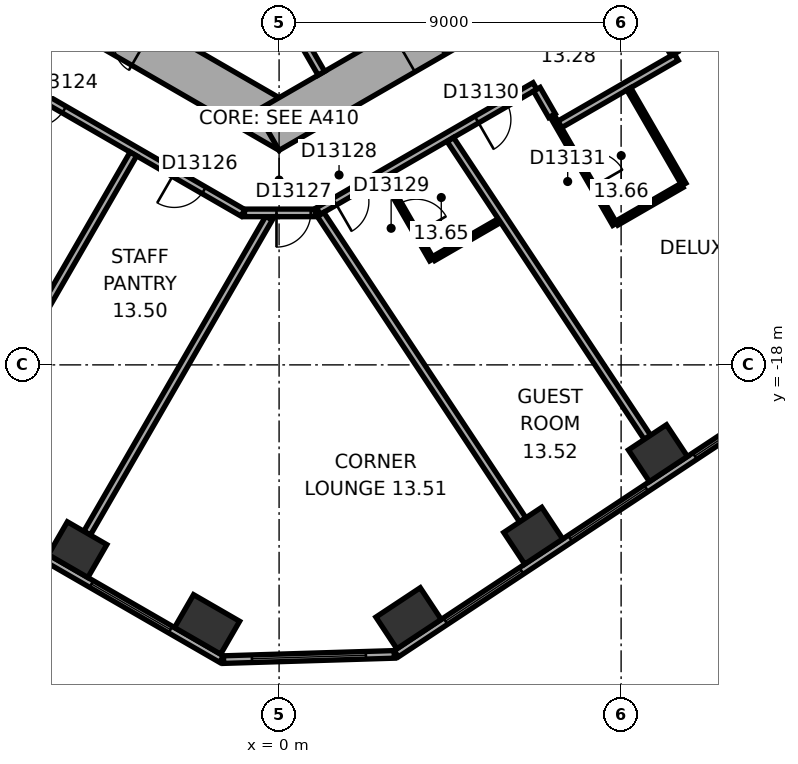
"""IFC4 building model, lengths in metres.
Left out: names, types, materials, properties, quantities, classifications, styles, units other than length and angle.
Written with IfcOpenShell. Run it as: python <this file> out.ifc"""

import sys

from ifc_helpers import new_model, si_unit, direction, frame, frame_2d, origin, origin_2d, place, context, subcontext, project, spatial, rectangle, extrude, element, fill, save


model = new_model("IFC4")
c1 = context("Model", 3, precision=1e-05, world=origin(), true_north=direction((0.0, 1.0)))
c2 = subcontext(c1, "Body", "Model", "MODEL_VIEW")
j1 = project(units=[si_unit("LENGTHUNIT", "METRE"), si_unit("PLANEANGLEUNIT", "RADIAN")], contexts=[c1])
p1 = place(None, origin())
s1 = spatial("IfcSite", under=j1, at=p1, CompositionType="ELEMENT")
p2 = place(p1, origin())
s2 = spatial("IfcBuilding", under=s1, at=p2, CompositionType="ELEMENT")
p3 = place(p2, frame((0.0, 0.0, 63.8)))
s3 = spatial("IfcBuildingStorey", under=s2, at=p3, CompositionType="ELEMENT", Elevation=63.8)
p4 = place(p3, frame((-5.302, -22.862, 0.0), z_axis=(0.0, 0.0, 1.0), x_axis=(0.866025403784, -0.5, 0.0)))
e1 = element("IfcColumn", 1, at=p4, inside=s3, PredefinedType="COLUMN", context=c2, shape_type="SweptSolid", body=[
    extrude(rectangle(XDim=1.2, YDim=1.0, at=origin_2d()), origin(), (0.0, 0.0, 1.0), 3.3),
])
for number, where, z_axis, x_axis in (
    (2, (-1.895, -24.829, 0.0), (0.0, 0.0, 1.0), (0.866, -0.5, 0.0)),
    (3, (3.407, -24.667, 0.0), (0.0, 0.0, 1.0), (0.834, 0.552, 0.0)),
):
    element("IfcColumn", number, at=place(p3, frame(where, z_axis=z_axis, x_axis=x_axis)), inside=s3, PredefinedType="COLUMN", context=c2, shape_type="SweptSolid", body=[
        extrude(rectangle(XDim=1.4, YDim=1.0, at=origin_2d()), origin(), (0.0, 0.0, 1.0), 3.3),
    ])
for number, where, z_axis, x_axis in (
    (4, (6.688, -22.496, 0.0), (0.0, 0.0, 1.0), (0.834, 0.552, 0.0)),
    (5, (9.969, -20.324, 0.0), (0.0, 0.0, 1.0), (0.834, 0.552, 0.0)),
):
    element("IfcColumn", number, at=place(p3, frame(where, z_axis=z_axis, x_axis=x_axis)), inside=s3, PredefinedType="COLUMN", context=c2, shape_type="SweptSolid", body=[
        extrude(rectangle(XDim=1.2, YDim=1.0, at=origin_2d()), origin(), (0.0, 0.0, 1.0), 3.3),
    ])
p5 = place(p3, frame((-10.4, -5.658, 0.0), z_axis=(0.0, 0.0, 1.0), x_axis=(0.866021384402, -0.500006961711, 0.0)))
e6 = element("IfcWall", 6, at=p5, inside=s3, PredefinedType="SHEAR", context=c2, shape_type="SweptSolid", body=[
    extrude(rectangle(XDim=12.355, YDim=1.2, at=frame_2d((6.178, 0.0))), origin(), (0.0, 0.0, 1.0), 3.3),
])
p6 = place(p5, frame((6.378, 0.0, 0.0)))
e7 = element("IfcOpeningElement", 7, at=p6, cuts=e6, PredefinedType="OPENING", context=c2, shape_type="SweptSolid", body=[
    extrude(rectangle(XDim=1.5, YDim=2.1, at=frame_2d((0.75, 1.05))), frame((0.0, 0.61, 0.0), z_axis=(0.0, -1.0, 0.0), x_axis=(1.0, 0.0, 0.0)), (0.0, 0.0, 1.0), 1.22),
])
p7 = place(p5, frame((3.228, 0.0, 0.0)))
e8 = element("IfcOpeningElement", 8, at=p7, cuts=e6, PredefinedType="OPENING", context=c2, shape_type="SweptSolid", body=[
    extrude(rectangle(XDim=0.9, YDim=2.1, at=frame_2d((0.45, 1.05))), frame((0.0, 0.61, 0.0), z_axis=(0.0, -1.0, 0.0), x_axis=(1.0, 0.0, 0.0)), (0.0, 0.0, 1.0), 1.22),
])
p8 = place(p3, frame((-0.3, -11.836, 0.0), z_axis=(0.0, 0.0, 1.0), x_axis=(0.866021384402, 0.500006961711, 0.0)))
e9 = element("IfcWall", 9, at=p8, inside=s3, PredefinedType="SHEAR", context=c2, shape_type="SweptSolid", body=[
    extrude(rectangle(XDim=12.355, YDim=1.2, at=frame_2d((6.178, 0.0))), origin(), (0.0, 0.0, 1.0), 3.3),
])
p9 = place(p8, frame((4.128, 0.0, 0.0)))
e10 = element("IfcOpeningElement", 10, at=p9, cuts=e9, PredefinedType="OPENING", context=c2, shape_type="SweptSolid", body=[
    extrude(rectangle(XDim=0.9, YDim=2.1, at=frame_2d((0.45, 1.05))), frame((0.0, 0.61, 0.0), z_axis=(0.0, -1.0, 0.0), x_axis=(1.0, 0.0, 0.0)), (0.0, 0.0, 1.0), 1.22),
])
p10 = place(p8, frame((7.928, 0.0, 0.0)))
e11 = element("IfcOpeningElement", 11, at=p10, cuts=e9, PredefinedType="OPENING", context=c2, shape_type="SweptSolid", body=[
    extrude(rectangle(XDim=1.1, YDim=2.1, at=frame_2d((0.55, 1.05))), frame((0.0, 0.61, 0.0), z_axis=(0.0, -1.0, 0.0), x_axis=(1.0, 0.0, 0.0)), (0.0, 0.0, 1.0), 1.22),
])
p11 = place(p3, frame((-19.914, -15.119, 0.0), z_axis=(0.0, 0.0, 1.0), x_axis=(0.866025418898, -0.499999973822, 0.0)))
e12 = element("IfcWall", 12, at=p11, inside=s3, PredefinedType="STANDARD", context=c2, shape_type="SweptSolid", body=[
    extrude(rectangle(XDim=21.246, YDim=0.2, at=frame_2d((10.623, 0.0))), origin(), (0.0, 0.0, 1.0), 3.3),
])
p12 = place(p11, frame((1.555, 0.0, 0.8)))
e13 = element("IfcOpeningElement", 13, at=p12, cuts=e12, PredefinedType="OPENING", context=c2, shape_type="SweptSolid", body=[
    extrude(rectangle(XDim=2.4, YDim=1.7, at=frame_2d((1.2, 0.85))), frame((0.0, 0.11, 0.0), z_axis=(0.0, -1.0, 0.0), x_axis=(1.0, 0.0, 0.0)), (0.0, 0.0, 1.0), 0.22),
])
p13 = place(p11, frame((5.489, 0.0, 0.8)))
e14 = element("IfcOpeningElement", 14, at=p13, cuts=e12, PredefinedType="OPENING", context=c2, shape_type="SweptSolid", body=[
    extrude(rectangle(XDim=2.4, YDim=1.7, at=frame_2d((1.2, 0.85))), frame((0.0, 0.11, 0.0), z_axis=(0.0, -1.0, 0.0), x_axis=(1.0, 0.0, 0.0)), (0.0, 0.0, 1.0), 0.22),
])
p14 = place(p11, frame((9.424, 0.0, 0.8)))
e15 = element("IfcOpeningElement", 15, at=p14, cuts=e12, PredefinedType="OPENING", context=c2, shape_type="SweptSolid", body=[
    extrude(rectangle(XDim=2.4, YDim=1.7, at=frame_2d((1.2, 0.85))), frame((0.0, 0.11, 0.0), z_axis=(0.0, -1.0, 0.0), x_axis=(1.0, 0.0, 0.0)), (0.0, 0.0, 1.0), 0.22),
])
p15 = place(p11, frame((13.358, 0.0, 0.8)))
e16 = element("IfcOpeningElement", 16, at=p15, cuts=e12, PredefinedType="OPENING", context=c2, shape_type="SweptSolid", body=[
    extrude(rectangle(XDim=2.4, YDim=1.7, at=frame_2d((1.2, 0.85))), frame((0.0, 0.11, 0.0), z_axis=(0.0, -1.0, 0.0), x_axis=(1.0, 0.0, 0.0)), (0.0, 0.0, 1.0), 0.22),
])
p16 = place(p11, frame((17.293, 0.0, 0.8)))
e17 = element("IfcOpeningElement", 17, at=p16, cuts=e12, PredefinedType="OPENING", context=c2, shape_type="SweptSolid", body=[
    extrude(rectangle(XDim=2.4, YDim=1.7, at=frame_2d((1.2, 0.85))), frame((0.0, 0.11, 0.0), z_axis=(0.0, -1.0, 0.0), x_axis=(1.0, 0.0, 0.0)), (0.0, 0.0, 1.0), 0.22),
])
p17 = place(p3, frame((-1.461, -25.755, 0.0), z_axis=(0.0, 0.0, 1.0), x_axis=(0.999533823446, 0.030530898895, 0.0)))
e18 = element("IfcWall", 18, at=p17, inside=s3, PredefinedType="STANDARD", context=c2, shape_type="SweptSolid", body=[
    extrude(rectangle(XDim=4.494, YDim=0.2, at=frame_2d((2.247, 0.0))), origin(), (0.0, 0.0, 1.0), 3.3),
])
p18 = place(p17, frame((0.747, 0.0, 0.8)))
e19 = element("IfcOpeningElement", 19, at=p18, cuts=e18, PredefinedType="OPENING", context=c2, shape_type="SweptSolid", body=[
    extrude(rectangle(XDim=3.0, YDim=1.7, at=frame_2d((1.5, 0.85))), frame((0.0, 0.11, 0.0), z_axis=(0.0, -1.0, 0.0), x_axis=(1.0, 0.0, 0.0)), (0.0, 0.0, 1.0), 0.22),
])
p19 = place(p3, frame((3.083, -25.601, 0.0), z_axis=(0.0, 0.0, 1.0), x_axis=(0.833884295743, 0.551939291329, 0.0)))
e20 = element("IfcWall", 20, at=p19, inside=s3, PredefinedType="STANDARD", context=c2, shape_type="SweptSolid", body=[
    extrude(rectangle(XDim=21.246, YDim=0.2, at=frame_2d((10.623, 0.0))), origin(), (0.0, 0.0, 1.0), 3.3),
])
p20 = place(p19, frame((1.553, 0.0, 0.8)))
e21 = element("IfcOpeningElement", 21, at=p20, cuts=e20, PredefinedType="OPENING", context=c2, shape_type="SweptSolid", body=[
    extrude(rectangle(XDim=2.4, YDim=1.7, at=frame_2d((1.2, 0.85))), frame((0.0, 0.11, 0.0), z_axis=(0.0, -1.0, 0.0), x_axis=(1.0, 0.0, 0.0)), (0.0, 0.0, 1.0), 0.22),
])
p21 = place(p19, frame((5.488, 0.0, 0.8)))
e22 = element("IfcOpeningElement", 22, at=p21, cuts=e20, PredefinedType="OPENING", context=c2, shape_type="SweptSolid", body=[
    extrude(rectangle(XDim=2.4, YDim=1.7, at=frame_2d((1.2, 0.85))), frame((0.0, 0.11, 0.0), z_axis=(0.0, -1.0, 0.0), x_axis=(1.0, 0.0, 0.0)), (0.0, 0.0, 1.0), 0.22),
])
p22 = place(p19, frame((9.422, 0.0, 0.8)))
e23 = element("IfcOpeningElement", 23, at=p22, cuts=e20, PredefinedType="OPENING", context=c2, shape_type="SweptSolid", body=[
    extrude(rectangle(XDim=2.4, YDim=1.7, at=frame_2d((1.2, 0.85))), frame((0.0, 0.11, 0.0), z_axis=(0.0, -1.0, 0.0), x_axis=(1.0, 0.0, 0.0)), (0.0, 0.0, 1.0), 0.22),
])
p23 = place(p19, frame((13.357, 0.0, 0.8)))
e24 = element("IfcOpeningElement", 24, at=p23, cuts=e20, PredefinedType="OPENING", context=c2, shape_type="SweptSolid", body=[
    extrude(rectangle(XDim=2.4, YDim=1.7, at=frame_2d((1.2, 0.85))), frame((0.0, 0.11, 0.0), z_axis=(0.0, -1.0, 0.0), x_axis=(1.0, 0.0, 0.0)), (0.0, 0.0, 1.0), 0.22),
])
p24 = place(p19, frame((17.291, 0.0, 0.8)))
e25 = element("IfcOpeningElement", 25, at=p24, cuts=e20, PredefinedType="OPENING", context=c2, shape_type="SweptSolid", body=[
    extrude(rectangle(XDim=2.4, YDim=1.7, at=frame_2d((1.2, 0.85))), frame((0.0, 0.11, 0.0), z_axis=(0.0, -1.0, 0.0), x_axis=(1.0, 0.0, 0.0)), (0.0, 0.0, 1.0), 0.22),
])
p25 = place(p3, frame((0.013, -8.422, 0.0), z_axis=(0.0, 0.0, 1.0), x_axis=(0.500077893725, -0.86598042715, 0.0)))
e26 = element("IfcWall", 26, at=p25, inside=s3, PredefinedType="PARTITIONING", context=c2, shape_type="SweptSolid", body=[
    extrude(rectangle(XDim=2.2, YDim=0.2, at=frame_2d((1.1, 0.0))), origin(), (0.0, 0.0, 1.0), 3.05),
])
p26 = place(p3, frame((-11.615, -7.843, 0.0), z_axis=(0.0, 0.0, 1.0), x_axis=(0.866026466995, -0.499998158461, 0.0)))
e27 = element("IfcWall", 27, at=p26, inside=s3, PredefinedType="PARTITIONING", context=c2, shape_type="SweptSolid", body=[
    extrude(rectangle(XDim=12.315, YDim=0.2, at=frame_2d((6.158, 0.0))), origin(), (0.0, 0.0, 1.0), 3.05),
])
p27 = place(p26, frame((5.983, 0.0, 0.0)))
e28 = element("IfcOpeningElement", 28, at=p27, cuts=e27, PredefinedType="OPENING", context=c2, shape_type="SweptSolid", body=[
    extrude(rectangle(XDim=0.9, YDim=2.1, at=frame_2d((0.45, 1.05))), frame((0.0, 0.11, 0.0), z_axis=(0.0, -1.0, 0.0), x_axis=(1.0, 0.0, 0.0)), (0.0, 0.0, 1.0), 0.22),
])
p28 = place(p26, frame((10.229, 0.0, 0.0)))
e29 = element("IfcOpeningElement", 29, at=p28, cuts=e27, PredefinedType="OPENING", context=c2, shape_type="SweptSolid", body=[
    extrude(rectangle(XDim=0.9, YDim=2.1, at=frame_2d((0.45, 1.05))), frame((0.0, 0.11, 0.0), z_axis=(0.0, -1.0, 0.0), x_axis=(1.0, 0.0, 0.0)), (0.0, 0.0, 1.0), 0.22),
])
p29 = place(p3, frame((-8.46, -20.461, 0.0), z_axis=(0.0, 0.0, 1.0), x_axis=(0.499999662836, 0.866025598446, 0.0)))
e30 = element("IfcWall", 30, at=p29, inside=s3, PredefinedType="PARTITIONING", context=c2, shape_type="SweptSolid", body=[
    extrude(rectangle(XDim=9.25, YDim=0.2, at=frame_2d((4.625, 0.0))), origin(), (0.0, 0.0, 1.0), 3.05),
])
p30 = place(p3, frame((-5.052, -22.429, 0.0), z_axis=(0.0, 0.0, 1.0), x_axis=(0.500004329283, 0.866022904257, 0.0)))
e31 = element("IfcWall", 31, at=p30, inside=s3, PredefinedType="PARTITIONING", context=c2, shape_type="SweptSolid", body=[
    extrude(rectangle(XDim=9.572, YDim=0.2, at=frame_2d((4.786, 0.0))), origin(), (0.0, 0.0, 1.0), 3.05),
])
p31 = place(p3, frame((-0.91, -14.001, 0.0), z_axis=(0.0, 0.0, 1.0), x_axis=(1.0, 0.0, 0.0)))
e32 = element("IfcWall", 32, at=p31, inside=s3, PredefinedType="PARTITIONING", context=c2, shape_type="SweptSolid", body=[
    extrude(rectangle(XDim=1.86, YDim=0.2, at=frame_2d((0.93, 0.0))), origin(), (0.0, 0.0, 1.0), 3.05),
])
p32 = place(p31, frame((0.842, 0.0, 0.0)))
e33 = element("IfcOpeningElement", 33, at=p32, cuts=e32, PredefinedType="OPENING", context=c2, shape_type="SweptSolid", body=[
    extrude(rectangle(XDim=0.9, YDim=2.1, at=frame_2d((0.45, 1.05))), frame((0.0, 0.11, 0.0), z_axis=(0.0, -1.0, 0.0), x_axis=(1.0, 0.0, 0.0)), (0.0, 0.0, 1.0), 0.22),
])
p33 = place(p3, frame((1.033, -13.953, 0.0), z_axis=(0.0, 0.0, 1.0), x_axis=(0.866017531406, 0.500013635111, 0.0)))
e34 = element("IfcWall", 34, at=p33, inside=s3, PredefinedType="PARTITIONING", context=c2, shape_type="SweptSolid", body=[
    extrude(rectangle(XDim=6.58, YDim=0.2, at=frame_2d((3.29, 0.0))), origin(), (0.0, 0.0, 1.0), 3.05),
])
p34 = place(p33, frame((0.496, 0.0, 0.0)))
e35 = element("IfcOpeningElement", 35, at=p34, cuts=e34, PredefinedType="OPENING", context=c2, shape_type="SweptSolid", body=[
    extrude(rectangle(XDim=0.9, YDim=2.1, at=frame_2d((0.45, 1.05))), frame((0.0, 0.11, 0.0), z_axis=(0.0, -1.0, 0.0), x_axis=(1.0, 0.0, 0.0)), (0.0, 0.0, 1.0), 0.22),
])
p35 = place(p33, frame((4.811, 0.0, 0.0)))
e36 = element("IfcOpeningElement", 36, at=p35, cuts=e34, PredefinedType="OPENING", context=c2, shape_type="SweptSolid", body=[
    extrude(rectangle(XDim=0.9, YDim=2.1, at=frame_2d((0.45, 1.05))), frame((0.0, 0.11, 0.0), z_axis=(0.0, -1.0, 0.0), x_axis=(1.0, 0.0, 0.0)), (0.0, 0.0, 1.0), 0.22),
])
p36 = place(p3, frame((4.015, -15.233, 0.0), z_axis=(0.0, 0.0, 1.0), x_axis=(-0.499961950354, 0.866047370643, 0.0)))
e37 = element("IfcWall", 37, at=p36, inside=s3, PredefinedType="PARTITIONING", context=c2, shape_type="SweptSolid", body=[
    extrude(rectangle(XDim=2.5, YDim=0.12, at=frame_2d((1.25, 0.0))), origin(), (0.0, 0.0, 1.0), 3.05),
])
p37 = place(p36, frame((0.8, 0.0, 0.0)))
e38 = element("IfcOpeningElement", 38, at=p37, cuts=e37, PredefinedType="OPENING", context=c2, shape_type="SweptSolid", body=[
    extrude(rectangle(XDim=0.9, YDim=2.1, at=frame_2d((0.45, 1.05))), frame((0.0, 0.07, 0.0), z_axis=(0.0, -1.0, 0.0), x_axis=(1.0, 0.0, 0.0)), (0.0, 0.0, 1.0), 0.14),
])
p38 = place(p3, frame((5.798, -14.204, 0.0), z_axis=(0.0, 0.0, 1.0), x_axis=(-0.865972029493, -0.500092435591, 0.0)))
e39 = element("IfcWall", 39, at=p38, inside=s3, PredefinedType="PARTITIONING", context=c2, shape_type="SweptSolid", body=[
    extrude(rectangle(XDim=1.999, YDim=0.12, at=frame_2d((1.0, 0.0))), origin(), (0.0, 0.0, 1.0), 3.05),
])
p39 = place(p3, frame((6.412, -22.079, 0.0), z_axis=(0.0, 0.0, 1.0), x_axis=(-0.551919507115, 0.83389739037, 0.0)))
e40 = element("IfcWall", 40, at=p39, inside=s3, PredefinedType="PARTITIONING", context=c2, shape_type="SweptSolid", body=[
    extrude(rectangle(XDim=9.635, YDim=0.2, at=frame_2d((4.817, 0.0))), origin(), (0.0, 0.0, 1.0), 3.05),
])
p40 = place(p3, frame((6.782, -10.749, 0.0), z_axis=(0.0, 0.0, 1.0), x_axis=(0.500170954823, -0.865926680471, 0.0)))
e41 = element("IfcWall", 41, at=p40, inside=s3, PredefinedType="PARTITIONING", context=c2, shape_type="SweptSolid", body=[
    extrude(rectangle(XDim=0.801, YDim=0.2, at=frame_2d((0.4, 0.0))), origin(), (0.0, 0.0, 1.0), 3.05),
])
p41 = place(p3, frame((7.385, -11.673, 0.0), z_axis=(0.0, 0.0, 1.0), x_axis=(0.866037524642, 0.499979005472, 0.0)))
e42 = element("IfcWall", 42, at=p41, inside=s3, PredefinedType="PARTITIONING", context=c2, shape_type="SweptSolid", body=[
    extrude(rectangle(XDim=3.542, YDim=0.2, at=frame_2d((1.771, 0.0))), origin(), (0.0, 0.0, 1.0), 3.05),
])
p42 = place(p3, frame((8.833, -14.301, 0.0), z_axis=(0.0, 0.0, 1.0), x_axis=(-0.499936836718, 0.866061868051, 0.0)))
e43 = element("IfcWall", 43, at=p42, inside=s3, PredefinedType="PARTITIONING", context=c2, shape_type="SweptSolid", body=[
    extrude(rectangle(XDim=3.188, YDim=0.12, at=frame_2d((1.594, 0.0))), origin(), (0.0, 0.0, 1.0), 3.05),
])
p43 = place(p42, frame((1.144, 0.0, 0.0)))
e44 = element("IfcOpeningElement", 44, at=p43, cuts=e43, PredefinedType="OPENING", context=c2, shape_type="SweptSolid", body=[
    extrude(rectangle(XDim=0.9, YDim=2.1, at=frame_2d((0.45, 1.05))), frame((0.0, 0.07, 0.0), z_axis=(0.0, -1.0, 0.0), x_axis=(1.0, 0.0, 0.0)), (0.0, 0.0, 1.0), 0.14),
])
p44 = place(p3, frame((9.203, -10.738, 0.0), z_axis=(0.0, 0.0, 1.0), x_axis=(0.50005036918, -0.865996321171, 0.0)))
e45 = element("IfcWall", 45, at=p44, inside=s3, PredefinedType="PARTITIONING", context=c2, shape_type="SweptSolid", body=[
    extrude(rectangle(XDim=2.9, YDim=0.12, at=frame_2d((1.45, 0.0))), origin(), (0.0, 0.0, 1.0), 3.05),
])
p45 = place(p3, frame((9.693, -19.907, 0.0), z_axis=(0.0, 0.0, 1.0), x_axis=(-0.551938394837, 0.833884889121, 0.0)))
e46 = element("IfcWall", 46, at=p45, inside=s3, PredefinedType="PARTITIONING", context=c2, shape_type="SweptSolid", body=[
    extrude(rectangle(XDim=9.394, YDim=0.2, at=frame_2d((4.697, 0.0))), origin(), (0.0, 0.0, 1.0), 2.6),
])
p46 = place(p3, frame((10.402, -9.815, 0.0), z_axis=(0.0, 0.0, 1.0), x_axis=(-0.499968756647, 0.866043441391, 0.0)))
e47 = element("IfcWall", 47, at=p46, inside=s3, PredefinedType="PARTITIONING", context=c2, shape_type="SweptSolid", body=[
    extrude(rectangle(XDim=1.001, YDim=0.2, at=frame_2d((0.5, 0.0))), origin(), (0.0, 0.0, 1.0), 3.05),
])
p47 = place(p3, frame((10.601, -13.28, 0.0), z_axis=(0.0, 0.0, 1.0), x_axis=(-0.866044057189, -0.499967689963, 0.0)))
e48 = element("IfcWall", 48, at=p47, inside=s3, PredefinedType="PARTITIONING", context=c2, shape_type="SweptSolid", body=[
    extrude(rectangle(XDim=1.982, YDim=0.12, at=frame_2d((0.991, 0.0))), origin(), (0.0, 0.0, 1.0), 3.05),
])
p48 = place(p3, frame((16.255, -15.564, 0.0), z_axis=(0.0, 0.0, 1.0), x_axis=(-0.55192208744, 0.833895682562, 0.0)))
e49 = element("IfcWall", 49, at=p48, inside=s3, PredefinedType="PARTITIONING", context=c2, shape_type="SweptSolid", body=[
    extrude(rectangle(XDim=8.913, YDim=0.2, at=frame_2d((4.457, 0.0))), origin(), (0.0, 0.0, 1.0), 2.6),
])
p49 = place(p16, origin())
e50 = element("IfcWindow", 50, at=p49, inside=s3, PartitioningType="SINGLE_PANEL", PredefinedType="WINDOW", context=c2, shape_type="SweptSolid", body=[
    extrude(rectangle(XDim=2.4, YDim=1.7, at=frame_2d((1.2, 0.85))), frame((0.0, 0.03, 0.0), z_axis=(0.0, -1.0, 0.0), x_axis=(1.0, 0.0, 0.0)), (0.0, 0.0, 1.0), 0.06),
])
fill(e17, e50)
p50 = place(p18, origin())
e51 = element("IfcWindow", 51, at=p50, inside=s3, PartitioningType="SINGLE_PANEL", PredefinedType="WINDOW", context=c2, shape_type="SweptSolid", body=[
    extrude(rectangle(XDim=3.0, YDim=1.7, at=frame_2d((1.5, 0.85))), frame((0.0, 0.03, 0.0), z_axis=(0.0, -1.0, 0.0), x_axis=(1.0, 0.0, 0.0)), (0.0, 0.0, 1.0), 0.06),
])
fill(e19, e51)
p51 = place(p20, origin())
e52 = element("IfcWindow", 52, at=p51, inside=s3, PartitioningType="SINGLE_PANEL", PredefinedType="WINDOW", context=c2, shape_type="SweptSolid", body=[
    extrude(rectangle(XDim=2.4, YDim=1.7, at=frame_2d((1.2, 0.85))), frame((0.0, 0.03, 0.0), z_axis=(0.0, -1.0, 0.0), x_axis=(1.0, 0.0, 0.0)), (0.0, 0.0, 1.0), 0.06),
])
fill(e21, e52)
p52 = place(p21, origin())
e53 = element("IfcWindow", 53, at=p52, inside=s3, PartitioningType="SINGLE_PANEL", PredefinedType="WINDOW", context=c2, shape_type="SweptSolid", body=[
    extrude(rectangle(XDim=2.4, YDim=1.7, at=frame_2d((1.2, 0.85))), frame((0.0, 0.03, 0.0), z_axis=(0.0, -1.0, 0.0), x_axis=(1.0, 0.0, 0.0)), (0.0, 0.0, 1.0), 0.06),
])
fill(e22, e53)
p53 = place(p22, origin())
e54 = element("IfcWindow", 54, at=p53, inside=s3, PartitioningType="SINGLE_PANEL", PredefinedType="WINDOW", context=c2, shape_type="SweptSolid", body=[
    extrude(rectangle(XDim=2.4, YDim=1.7, at=frame_2d((1.2, 0.85))), frame((0.0, 0.03, 0.0), z_axis=(0.0, -1.0, 0.0), x_axis=(1.0, 0.0, 0.0)), (0.0, 0.0, 1.0), 0.06),
])
fill(e23, e54)
p54 = place(p9, origin())
e55 = element("IfcDoor", 55, at=p54, inside=s3, OperationType="SINGLE_SWING_LEFT", PredefinedType="DOOR", context=c2, shape_type="SweptSolid", body=[
    extrude(rectangle(XDim=0.9, YDim=2.1, at=frame_2d((0.45, 1.05))), frame((0.0, 0.025, 0.0), z_axis=(0.0, -1.0, 0.0), x_axis=(1.0, 0.0, 0.0)), (0.0, 0.0, 1.0), 0.05),
])
fill(e10, e55)
p55 = place(p27, origin())
e56 = element("IfcDoor", 56, at=p55, inside=s3, OperationType="SINGLE_SWING_LEFT", PredefinedType="DOOR", context=c2, shape_type="SweptSolid", body=[
    extrude(rectangle(XDim=0.9, YDim=2.1, at=frame_2d((0.45, 1.05))), frame((0.0, 0.025, 0.0), z_axis=(0.0, -1.0, 0.0), x_axis=(1.0, 0.0, 0.0)), (0.0, 0.0, 1.0), 0.05),
])
fill(e28, e56)
p56 = place(p28, origin())
e57 = element("IfcDoor", 57, at=p56, inside=s3, OperationType="SINGLE_SWING_LEFT", PredefinedType="DOOR", context=c2, shape_type="SweptSolid", body=[
    extrude(rectangle(XDim=0.9, YDim=2.1, at=frame_2d((0.45, 1.05))), frame((0.0, 0.025, 0.0), z_axis=(0.0, -1.0, 0.0), x_axis=(1.0, 0.0, 0.0)), (0.0, 0.0, 1.0), 0.05),
])
fill(e29, e57)
p57 = place(p32, origin())
e58 = element("IfcDoor", 58, at=p57, inside=s3, OperationType="SINGLE_SWING_LEFT", PredefinedType="DOOR", context=c2, shape_type="SweptSolid", body=[
    extrude(rectangle(XDim=0.9, YDim=2.1, at=frame_2d((0.45, 1.05))), frame((0.0, 0.025, 0.0), z_axis=(0.0, -1.0, 0.0), x_axis=(1.0, 0.0, 0.0)), (0.0, 0.0, 1.0), 0.05),
])
fill(e33, e58)
p58 = place(p34, origin())
e59 = element("IfcDoor", 59, at=p58, inside=s3, OperationType="SINGLE_SWING_LEFT", PredefinedType="DOOR", context=c2, shape_type="SweptSolid", body=[
    extrude(rectangle(XDim=0.9, YDim=2.1, at=frame_2d((0.45, 1.05))), frame((0.0, 0.025, 0.0), z_axis=(0.0, -1.0, 0.0), x_axis=(1.0, 0.0, 0.0)), (0.0, 0.0, 1.0), 0.05),
])
fill(e35, e59)
p59 = place(p37, origin())
e60 = element("IfcDoor", 60, at=p59, inside=s3, OperationType="SINGLE_SWING_LEFT", PredefinedType="DOOR", context=c2, shape_type="SweptSolid", body=[
    extrude(rectangle(XDim=0.9, YDim=2.1, at=frame_2d((0.45, 1.05))), frame((0.0, 0.025, 0.0), z_axis=(0.0, -1.0, 0.0), x_axis=(1.0, 0.0, 0.0)), (0.0, 0.0, 1.0), 0.05),
])
fill(e38, e60)
p60 = place(p35, origin())
e61 = element("IfcDoor", 61, at=p60, inside=s3, OperationType="SINGLE_SWING_LEFT", PredefinedType="DOOR", context=c2, shape_type="SweptSolid", body=[
    extrude(rectangle(XDim=0.9, YDim=2.1, at=frame_2d((0.45, 1.05))), frame((0.0, 0.025, 0.0), z_axis=(0.0, -1.0, 0.0), x_axis=(1.0, 0.0, 0.0)), (0.0, 0.0, 1.0), 0.05),
])
fill(e36, e61)
p61 = place(p43, origin())
e62 = element("IfcDoor", 62, at=p61, inside=s3, OperationType="SINGLE_SWING_LEFT", PredefinedType="DOOR", context=c2, shape_type="SweptSolid", body=[
    extrude(rectangle(XDim=0.9, YDim=2.1, at=frame_2d((0.45, 1.05))), frame((0.0, 0.025, 0.0), z_axis=(0.0, -1.0, 0.0), x_axis=(1.0, 0.0, 0.0)), (0.0, 0.0, 1.0), 0.05),
])
fill(e44, e62)
save(model, sys.argv[1])
